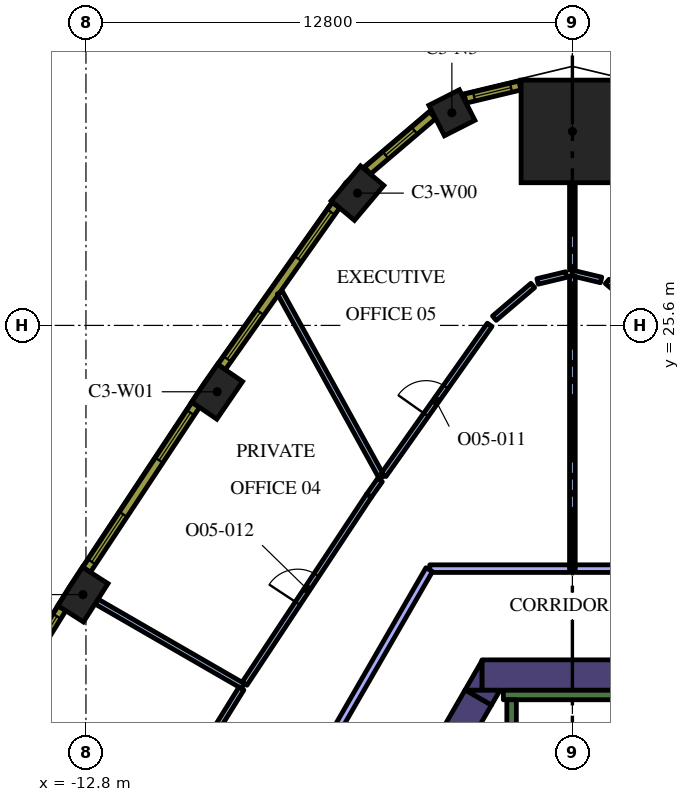
"""IFC4 building model, lengths in metres.
Left out: names, types, materials, properties, quantities, classifications, styles, units other than length and angle.
Written with IfcOpenShell. Run it as: python <this file> out.ifc"""

import sys

from ifc_helpers import new_model, si_unit, direction, frame, frame_2d, origin, origin_2d, place, context, subcontext, project, spatial, polyline, rectangle, outline, extrude, element, fill, save


model = new_model("IFC4")
c1 = context("Model", 3, precision=1e-05, world=origin(), true_north=direction((0.0, 1.0)))
c2 = subcontext(c1, "Body", "Model", "MODEL_VIEW")
j1 = project(units=[si_unit("LENGTHUNIT", "METRE"), si_unit("PLANEANGLEUNIT", "RADIAN")], contexts=[c1])
p1 = place(None, origin())
s1 = spatial("IfcSite", under=j1, at=p1, CompositionType="ELEMENT")
p2 = place(p1, origin())
s2 = spatial("IfcBuilding", under=s1, at=p2, CompositionType="ELEMENT")
p3 = place(p2, frame((0.0, 0.0, 192.0)))
s3 = spatial("IfcBuildingStorey", under=s2, at=p3, CompositionType="ELEMENT", Elevation=192.0)
p4 = place(p3, frame((0.0, 30.704, 0.0), z_axis=(0.0, 0.0, 1.0), x_axis=(0.0, 1.0, 0.0)))
e1 = element("IfcColumn", 1, at=p4, inside=s3, PredefinedType="COLUMN", context=c2, shape_type="SweptSolid", body=[
    extrude(rectangle(XDim=2.7, YDim=2.7, at=origin_2d()), origin(), (0.0, 0.0, 1.0), 4.2),
])
p5 = place(p3, frame((-3.171, 31.195, 0.0), z_axis=(0.0, 0.0, 1.0), x_axis=(-0.891486197647, -0.453047855535, 0.0)))
e2 = element("IfcColumn", 2, at=p5, inside=s3, PredefinedType="COLUMN", context=c2, shape_type="SweptSolid", body=[
    extrude(rectangle(XDim=0.9, YDim=0.9, at=origin_2d()), origin(), (0.0, 0.0, 1.0), 4.2),
])
for number, where, z_axis, x_axis in (
    (3, (-5.654, 29.081, 0.0), (0.0, 0.0, 1.0), (-0.644, -0.765, 0.0)),
    (4, (-9.348, 23.854, 0.0), (0.0, 0.0, 1.0), (-0.565, -0.825, 0.0)),
    (5, (-12.88, 18.517, 0.0), (0.0, 0.0, 1.0), (-0.539, -0.842, 0.0)),
):
    element("IfcColumn", number, at=place(p3, frame(where, z_axis=z_axis, x_axis=x_axis)), inside=s3, PredefinedType="COLUMN", context=c2, shape_type="SweptSolid", body=[
        extrude(rectangle(XDim=1.2, YDim=0.8, at=origin_2d()), origin(), (0.0, 0.0, 1.0), 4.2),
    ])
p6 = place(p3, frame((-2.379, 16.4, 0.0), z_axis=(0.0, 0.0, 1.0), x_axis=(1.0, 0.0, 0.0)))
e6 = element("IfcWall", 6, at=p6, inside=s3, PredefinedType="SOLIDWALL", context=c2, shape_type="SweptSolid", body=[
    extrude(rectangle(XDim=3.824, YDim=0.8, at=frame_2d((1.912, 0.0))), origin(), (0.0, 0.0, 1.0), 4.2),
])
p7 = place(p3, origin())
e7 = element("IfcWall", 7, at=p7, inside=s3, PredefinedType="SOLIDWALL", context=c2, shape_type="SweptSolid", body=[
    extrude(outline(polyline([(-2.829, 16.0), (-2.381, 16.776), (-2.381, 16.0), (-2.829, 16.0)])), origin(), (0.0, 0.0, 1.0), 4.2),
])
p8 = place(p3, frame((-2.477, 15.81, 0.0), z_axis=(0.0, 0.0, 1.0), x_axis=(-0.499903161488, -0.866081306307, 0.0)))
e8 = element("IfcWall", 8, at=p8, inside=s3, PredefinedType="SOLIDWALL", context=c2, shape_type="SweptSolid", body=[
    extrude(rectangle(XDim=1.988, YDim=0.8, at=frame_2d((0.994, 0.0))), origin(), (0.0, 0.0, 1.0), 4.2),
])
e9 = element("IfcWall", 9, at=p7, inside=s3, PredefinedType="SOLIDWALL", context=c2, shape_type="SweptSolid", body=[
    extrude(outline(polyline([(-1.905, 16.0), (-2.129, 15.612), (-2.801, 16.0), (-1.905, 16.0)])), origin(), (0.0, 0.0, 1.0), 4.2),
])
p9 = place(p3, frame((-1.817, 15.875, 0.0), z_axis=(0.0, 0.0, 1.0), x_axis=(1.0, 0.0, 0.0)))
e10 = element("IfcWall", 10, at=p9, inside=s3, PredefinedType="SOLIDWALL", context=c2, shape_type="SweptSolid", body=[
    extrude(rectangle(XDim=3.634, YDim=0.25, at=frame_2d((1.817, 0.0))), origin(), (0.0, 0.0, 1.0), 4.2),
])
p10 = place(p3, frame((-1.6, 8.7, 0.0), z_axis=(0.0, 0.0, 1.0), x_axis=(0.0, 1.0, 0.0)))
e11 = element("IfcWall", 11, at=p10, inside=s3, PredefinedType="SOLIDWALL", context=c2, shape_type="SweptSolid", body=[
    extrude(rectangle(XDim=7.05, YDim=0.25, at=frame_2d((3.525, 0.0))), origin(), (0.0, 0.0, 1.0), 4.2),
])
p11 = place(p3, frame((1.89, 25.929, 0.0), z_axis=(0.0, 0.0, 1.0), x_axis=(-0.761368905571, 0.648318895012, 0.0)))
e12 = element("IfcWall", 12, at=p11, inside=s3, PredefinedType="PARTITIONING", context=c2, shape_type="SweptSolid", body=[
    extrude(rectangle(XDim=1.279, YDim=0.15, at=frame_2d((0.639, 0.0))), origin(), (0.0, 0.0, 1.0), 3.1),
])
p12 = place(p3, frame((0.756, 26.796, 0.0), z_axis=(0.0, 0.0, 1.0), x_axis=(-0.972515505601, 0.232838122666, 0.0)))
e13 = element("IfcWall", 13, at=p12, inside=s3, PredefinedType="PARTITIONING", context=c2, shape_type="SweptSolid", body=[
    extrude(rectangle(XDim=0.777, YDim=0.15, at=frame_2d((0.388, 0.0))), origin(), (0.0, 0.0, 1.0), 3.1),
])
p13 = place(p3, frame((0.0, 27.054, 0.0), z_axis=(0.0, 0.0, 1.0), x_axis=(0.0, 1.0, 0.0)))
e14 = element("IfcWall", 14, at=p13, inside=s3, PredefinedType="PARTITIONING", context=c2, shape_type="SweptSolid", body=[
    extrude(rectangle(XDim=2.3, YDim=0.15, at=frame_2d((1.15, 0.0))), origin(), (0.0, 0.0, 1.0), 3.1),
])
p14 = place(p3, frame((0.0, 19.2, 0.0), z_axis=(0.0, 0.0, 1.0), x_axis=(0.0, 1.0, 0.0)))
e15 = element("IfcWall", 15, at=p14, inside=s3, PredefinedType="PARTITIONING", context=c2, shape_type="SweptSolid", body=[
    extrude(rectangle(XDim=7.7, YDim=0.15, at=frame_2d((3.85, 0.0))), origin(), (0.0, 0.0, 1.0), 3.1),
])
p15 = place(p3, frame((3.723, 19.2, 0.0), z_axis=(0.0, 0.0, 1.0), x_axis=(-1.0, 0.0, 0.0)))
e16 = element("IfcWall", 16, at=p15, inside=s3, PredefinedType="PARTITIONING", context=c2, shape_type="SweptSolid", body=[
    extrude(rectangle(XDim=3.648, YDim=0.2, at=frame_2d((1.824, 0.0))), origin(), (0.0, 0.0, 1.0), 3.1),
])
p16 = place(p3, frame((-5.014, 21.599, 0.0), z_axis=(0.0, 0.0, 1.0), x_axis=(-0.483014624036, 0.875612284614, 0.0)))
e17 = element("IfcWall", 17, at=p16, inside=s3, PredefinedType="PARTITIONING", context=c2, shape_type="SweptSolid", body=[
    extrude(rectangle(XDim=5.557, YDim=0.15, at=frame_2d((2.778, 0.0))), origin(), (0.0, 0.0, 1.0), 3.1),
])
p17 = place(p3, frame((-0.161, 26.939, 0.0), z_axis=(0.0, 0.0, 1.0), x_axis=(-0.972515505601, -0.232838122666, 0.0)))
e18 = element("IfcWall", 18, at=p17, inside=s3, PredefinedType="PARTITIONING", context=c2, shape_type="SweptSolid", body=[
    extrude(rectangle(XDim=0.777, YDim=0.15, at=frame_2d((0.388, 0.0))), origin(), (0.0, 0.0, 1.0), 3.1),
])
p18 = place(p3, frame((-1.042, 26.65, 0.0), z_axis=(0.0, 0.0, 1.0), x_axis=(-0.761485303115, -0.648182175888, 0.0)))
e19 = element("IfcWall", 19, at=p18, inside=s3, PredefinedType="PARTITIONING", context=c2, shape_type="SweptSolid", body=[
    extrude(rectangle(XDim=1.327, YDim=0.15, at=frame_2d((0.664, 0.0))), origin(), (0.0, 0.0, 1.0), 3.1),
])
p19 = place(p3, frame((-4.966, 21.667, 0.0), z_axis=(0.0, 0.0, 1.0), x_axis=(0.577107482578, 0.816668202854, 0.0)))
e20 = element("IfcWall", 20, at=p19, inside=s3, PredefinedType="PARTITIONING", context=c2, shape_type="SweptSolid", body=[
    extrude(rectangle(XDim=4.834, YDim=0.15, at=frame_2d((2.417, 0.0))), origin(), (0.0, 0.0, 1.0), 3.1),
])
p20 = place(p19, frame((1.934, 0.0, 0.0)))
e21 = element("IfcOpeningElement", 21, at=p20, cuts=e20, PredefinedType="OPENING", context=c2, shape_type="SweptSolid", body=[
    extrude(rectangle(XDim=0.9, YDim=2.1, at=frame_2d((0.45, 1.05))), frame((0.0, 0.085, 0.0), z_axis=(0.0, -1.0, 0.0), x_axis=(1.0, 0.0, 0.0)), (0.0, 0.0, 1.0), 0.17),
])
p21 = place(p3, frame((-8.669, 16.11, 0.0), z_axis=(0.0, 0.0, 1.0), x_axis=(-0.866019272134, 0.50001062018, 0.0)))
e22 = element("IfcWall", 22, at=p21, inside=s3, PredefinedType="PARTITIONING", context=c2, shape_type="SweptSolid", body=[
    extrude(rectangle(XDim=4.449, YDim=0.15, at=frame_2d((2.225, 0.0))), origin(), (0.0, 0.0, 1.0), 3.1),
])
p22 = place(p3, frame((-5.062, 21.531, 0.0), z_axis=(0.0, 0.0, 1.0), x_axis=(-0.57727495493, -0.816549830941, 0.0)))
e23 = element("IfcWall", 23, at=p22, inside=s3, PredefinedType="PARTITIONING", context=c2, shape_type="SweptSolid", body=[
    extrude(rectangle(XDim=0.502, YDim=0.15, at=frame_2d((0.251, 0.0))), origin(), (0.0, 0.0, 1.0), 3.1),
])
p23 = place(p3, frame((-8.627, 16.173, 0.0), z_axis=(0.0, 0.0, 1.0), x_axis=(0.551896352686, 0.833912714792, 0.0)))
e24 = element("IfcWall", 24, at=p23, inside=s3, PredefinedType="PARTITIONING", context=c2, shape_type="SweptSolid", body=[
    extrude(rectangle(XDim=5.934, YDim=0.15, at=frame_2d((2.967, 0.0))), origin(), (0.0, 0.0, 1.0), 3.1),
])
p24 = place(p23, frame((2.534, 0.0, 0.0)))
e25 = element("IfcOpeningElement", 25, at=p24, cuts=e24, PredefinedType="OPENING", context=c2, shape_type="SweptSolid", body=[
    extrude(rectangle(XDim=0.9, YDim=2.1, at=frame_2d((0.45, 1.05))), frame((0.0, 0.085, 0.0), z_axis=(0.0, -1.0, 0.0), x_axis=(1.0, 0.0, 0.0)), (0.0, 0.0, 1.0), 0.17),
])
p25 = place(p3, frame((-12.093, 10.591, 0.0), z_axis=(0.0, 0.0, 1.0), x_axis=(0.527179193015, 0.849754140003, 0.0)))
e26 = element("IfcWall", 26, at=p25, inside=s3, PredefinedType="PARTITIONING", context=c2, shape_type="SweptSolid", body=[
    extrude(rectangle(XDim=6.42, YDim=0.15, at=frame_2d((3.21, 0.0))), origin(), (0.0, 0.0, 1.0), 3.1),
])
p26 = place(p25, frame((2.719, 0.0, 0.0)))
e27 = element("IfcOpeningElement", 27, at=p26, cuts=e26, PredefinedType="OPENING", context=c2, shape_type="SweptSolid", body=[
    extrude(rectangle(XDim=0.9, YDim=2.1, at=frame_2d((0.45, 1.05))), frame((0.0, 0.085, 0.0), z_axis=(0.0, -1.0, 0.0), x_axis=(1.0, 0.0, 0.0)), (0.0, 0.0, 1.0), 0.17),
])
p27 = place(p3, frame((-0.075, 19.2, 0.0), z_axis=(0.0, 0.0, 1.0), x_axis=(-1.0, 0.0, 0.0)))
e28 = element("IfcWall", 28, at=p27, inside=s3, PredefinedType="PARTITIONING", context=c2, shape_type="SweptSolid", body=[
    extrude(rectangle(XDim=3.678, YDim=0.2, at=frame_2d((1.839, 0.0))), origin(), (0.0, 0.0, 1.0), 3.1),
])
p28 = place(p3, frame((-3.768, 19.174, 0.0), z_axis=(0.0, 0.0, 1.0), x_axis=(-0.499985066967, -0.866034025203, 0.0)))
e29 = element("IfcWall", 29, at=p28, inside=s3, PredefinedType="PARTITIONING", context=c2, shape_type="SweptSolid", body=[
    extrude(rectangle(XDim=8.691, YDim=0.2, at=frame_2d((4.346, 0.0))), origin(), (0.0, 0.0, 1.0), 3.1),
])
p29 = place(p3, frame((-1.38, 31.912, 0.0), z_axis=(0.0, 0.0, 1.0), x_axis=(-0.972479955788, -0.232986556673, 0.0)))
e30 = element("IfcWall", 30, at=p29, inside=s3, PredefinedType="SOLIDWALL", context=c2, shape_type="SweptSolid", body=[
    extrude(rectangle(XDim=1.482, YDim=0.24, at=frame_2d((0.741, 0.0))), origin(), (0.0, 0.0, 1.0), 3.9),
])
p30 = place(p29, frame((0.241, 0.0, 0.9)))
e31 = element("IfcOpeningElement", 31, at=p30, cuts=e30, PredefinedType="OPENING", context=c2, shape_type="SweptSolid", body=[
    extrude(rectangle(XDim=1.0, YDim=2.55, at=frame_2d((0.5, 1.275))), frame((0.0, 0.13, 0.0), z_axis=(0.0, -1.0, 0.0), x_axis=(1.0, 0.0, 0.0)), (0.0, 0.0, 1.0), 0.26),
])
p31 = place(p3, frame((-3.678, 31.131, 0.0), z_axis=(0.0, 0.0, 1.0), x_axis=(-0.761419744247, -0.648259186645, 0.0)))
e32 = element("IfcWall", 32, at=p31, inside=s3, PredefinedType="SOLIDWALL", context=c2, shape_type="SweptSolid", body=[
    extrude(rectangle(XDim=2.25, YDim=0.24, at=frame_2d((1.125, 0.0))), origin(), (0.0, 0.0, 1.0), 3.9),
])
p32 = place(p31, frame((0.625, 0.0, 0.9)))
e33 = element("IfcOpeningElement", 33, at=p32, cuts=e32, PredefinedType="OPENING", context=c2, shape_type="SweptSolid", body=[
    extrude(rectangle(XDim=1.0, YDim=2.55, at=frame_2d((0.5, 1.275))), frame((0.0, 0.13, 0.0), z_axis=(0.0, -1.0, 0.0), x_axis=(1.0, 0.0, 0.0)), (0.0, 0.0, 1.0), 0.26),
])
p33 = place(p3, frame((-6.223, 28.762, 0.0), z_axis=(0.0, 0.0, 1.0), x_axis=(-0.577115207679, -0.816662743772, 0.0)))
e34 = element("IfcWall", 34, at=p33, inside=s3, PredefinedType="SOLIDWALL", context=c2, shape_type="SweptSolid", body=[
    extrude(rectangle(XDim=5.213, YDim=0.24, at=frame_2d((2.606, 0.0))), origin(), (0.0, 0.0, 1.0), 3.9),
])
p34 = place(p33, frame((0.221, 0.0, 0.9)))
e35 = element("IfcOpeningElement", 35, at=p34, cuts=e34, PredefinedType="OPENING", context=c2, shape_type="SweptSolid", body=[
    extrude(rectangle(XDim=1.5, YDim=2.55, at=frame_2d((0.75, 1.275))), frame((0.0, 0.13, 0.0), z_axis=(0.0, -1.0, 0.0), x_axis=(1.0, 0.0, 0.0)), (0.0, 0.0, 1.0), 0.26),
])
p35 = place(p33, frame((3.452, 0.0, 0.9)))
e36 = element("IfcOpeningElement", 36, at=p35, cuts=e34, PredefinedType="OPENING", context=c2, shape_type="SweptSolid", body=[
    extrude(rectangle(XDim=1.5, YDim=2.55, at=frame_2d((0.75, 1.275))), frame((0.0, 0.13, 0.0), z_axis=(0.0, -1.0, 0.0), x_axis=(1.0, 0.0, 0.0)), (0.0, 0.0, 1.0), 0.26),
])
p36 = place(p3, frame((-9.911, 23.51, 0.0), z_axis=(0.0, 0.0, 1.0), x_axis=(-0.551892811511, -0.833915058386, 0.0)))
e37 = element("IfcWall", 37, at=p36, inside=s3, PredefinedType="SOLIDWALL", context=c2, shape_type="SweptSolid", body=[
    extrude(rectangle(XDim=5.204, YDim=0.24, at=frame_2d((2.602, 0.0))), origin(), (0.0, 0.0, 1.0), 3.9),
])
p37 = place(p36, frame((0.248, 0.0, 0.9)))
e38 = element("IfcOpeningElement", 38, at=p37, cuts=e37, PredefinedType="OPENING", context=c2, shape_type="SweptSolid", body=[
    extrude(rectangle(XDim=1.5, YDim=2.55, at=frame_2d((0.75, 1.275))), frame((0.0, 0.13, 0.0), z_axis=(0.0, -1.0, 0.0), x_axis=(1.0, 0.0, 0.0)), (0.0, 0.0, 1.0), 0.26),
])
p38 = place(p36, frame((3.455, 0.0, 0.9)))
e39 = element("IfcOpeningElement", 39, at=p38, cuts=e37, PredefinedType="OPENING", context=c2, shape_type="SweptSolid", body=[
    extrude(rectangle(XDim=1.5, YDim=2.55, at=frame_2d((0.75, 1.275))), frame((0.0, 0.13, 0.0), z_axis=(0.0, -1.0, 0.0), x_axis=(1.0, 0.0, 0.0)), (0.0, 0.0, 1.0), 0.26),
])
p39 = place(p3, frame((-13.433, 18.156, 0.0), z_axis=(0.0, 0.0, 1.0), x_axis=(-0.526197926587, -0.850362124072, 0.0)))
e40 = element("IfcWall", 40, at=p39, inside=s3, PredefinedType="SOLIDWALL", context=c2, shape_type="SweptSolid", body=[
    extrude(rectangle(XDim=5.203, YDim=0.24, at=frame_2d((2.602, 0.0))), origin(), (0.0, 0.0, 1.0), 3.9),
])
p40 = place(p39, frame((0.248, 0.0, 0.9)))
e41 = element("IfcOpeningElement", 41, at=p40, cuts=e40, PredefinedType="OPENING", context=c2, shape_type="SweptSolid", body=[
    extrude(rectangle(XDim=1.5, YDim=2.55, at=frame_2d((0.75, 1.275))), frame((0.0, 0.13, 0.0), z_axis=(0.0, -1.0, 0.0), x_axis=(1.0, 0.0, 0.0)), (0.0, 0.0, 1.0), 0.26),
])
p41 = place(p39, frame((3.455, 0.0, 0.9)))
e42 = element("IfcOpeningElement", 42, at=p41, cuts=e40, PredefinedType="OPENING", context=c2, shape_type="SweptSolid", body=[
    extrude(rectangle(XDim=1.5, YDim=2.55, at=frame_2d((0.75, 1.275))), frame((0.0, 0.13, 0.0), z_axis=(0.0, -1.0, 0.0), x_axis=(1.0, 0.0, 0.0)), (0.0, 0.0, 1.0), 0.26),
])
p42 = place(p20, origin())
e43 = element("IfcDoor", 43, at=p42, inside=s3, OperationType="SINGLE_SWING_LEFT", PredefinedType="DOOR", context=c2, shape_type="SweptSolid", body=[
    extrude(rectangle(XDim=0.9, YDim=2.1, at=frame_2d((0.45, 1.05))), frame((0.0, 0.025, 0.0), z_axis=(0.0, -1.0, 0.0), x_axis=(1.0, 0.0, 0.0)), (0.0, 0.0, 1.0), 0.05),
])
fill(e21, e43)
p43 = place(p24, origin())
e44 = element("IfcDoor", 44, at=p43, inside=s3, OperationType="SINGLE_SWING_RIGHT", PredefinedType="DOOR", context=c2, shape_type="SweptSolid", body=[
    extrude(rectangle(XDim=0.9, YDim=2.1, at=frame_2d((0.45, 1.05))), frame((0.0, 0.025, 0.0), z_axis=(0.0, -1.0, 0.0), x_axis=(1.0, 0.0, 0.0)), (0.0, 0.0, 1.0), 0.05),
])
fill(e25, e44)
p44 = place(p30, origin())
e45 = element("IfcWindow", 45, at=p44, inside=s3, PartitioningType="SINGLE_PANEL", PredefinedType="WINDOW", context=c2, shape_type="SweptSolid", body=[
    extrude(rectangle(XDim=1.0, YDim=2.55, at=frame_2d((0.5, 1.275))), frame((0.0, 0.04, 0.0), z_axis=(0.0, -1.0, 0.0), x_axis=(1.0, 0.0, 0.0)), (0.0, 0.0, 1.0), 0.06),
])
fill(e31, e45)
p45 = place(p32, origin())
e46 = element("IfcWindow", 46, at=p45, inside=s3, PartitioningType="SINGLE_PANEL", PredefinedType="WINDOW", context=c2, shape_type="SweptSolid", body=[
    extrude(rectangle(XDim=1.0, YDim=2.55, at=frame_2d((0.5, 1.275))), frame((0.0, 0.04, 0.0), z_axis=(0.0, -1.0, 0.0), x_axis=(1.0, 0.0, 0.0)), (0.0, 0.0, 1.0), 0.06),
])
fill(e33, e46)
p46 = place(p34, origin())
e47 = element("IfcWindow", 47, at=p46, inside=s3, PartitioningType="SINGLE_PANEL", PredefinedType="WINDOW", context=c2, shape_type="SweptSolid", body=[
    extrude(rectangle(XDim=1.5, YDim=2.55, at=frame_2d((0.75, 1.275))), frame((0.0, 0.04, 0.0), z_axis=(0.0, -1.0, 0.0), x_axis=(1.0, 0.0, 0.0)), (0.0, 0.0, 1.0), 0.06),
])
fill(e35, e47)
p47 = place(p35, origin())
e48 = element("IfcWindow", 48, at=p47, inside=s3, PartitioningType="SINGLE_PANEL", PredefinedType="WINDOW", context=c2, shape_type="SweptSolid", body=[
    extrude(rectangle(XDim=1.5, YDim=2.55, at=frame_2d((0.75, 1.275))), frame((0.0, 0.04, 0.0), z_axis=(0.0, -1.0, 0.0), x_axis=(1.0, 0.0, 0.0)), (0.0, 0.0, 1.0), 0.06),
])
fill(e36, e48)
p48 = place(p37, origin())
e49 = element("IfcWindow", 49, at=p48, inside=s3, PartitioningType="SINGLE_PANEL", PredefinedType="WINDOW", context=c2, shape_type="SweptSolid", body=[
    extrude(rectangle(XDim=1.5, YDim=2.55, at=frame_2d((0.75, 1.275))), frame((0.0, 0.04, 0.0), z_axis=(0.0, -1.0, 0.0), x_axis=(1.0, 0.0, 0.0)), (0.0, 0.0, 1.0), 0.06),
])
fill(e38, e49)
p49 = place(p38, origin())
e50 = element("IfcWindow", 50, at=p49, inside=s3, PartitioningType="SINGLE_PANEL", PredefinedType="WINDOW", context=c2, shape_type="SweptSolid", body=[
    extrude(rectangle(XDim=1.5, YDim=2.55, at=frame_2d((0.75, 1.275))), frame((0.0, 0.04, 0.0), z_axis=(0.0, -1.0, 0.0), x_axis=(1.0, 0.0, 0.0)), (0.0, 0.0, 1.0), 0.06),
])
fill(e39, e50)
p50 = place(p40, origin())
e51 = element("IfcWindow", 51, at=p50, inside=s3, PartitioningType="SINGLE_PANEL", PredefinedType="WINDOW", context=c2, shape_type="SweptSolid", body=[
    extrude(rectangle(XDim=1.5, YDim=2.55, at=frame_2d((0.75, 1.275))), frame((0.0, 0.04, 0.0), z_axis=(0.0, -1.0, 0.0), x_axis=(1.0, 0.0, 0.0)), (0.0, 0.0, 1.0), 0.06),
])
fill(e41, e51)
save(model, sys.argv[1])
